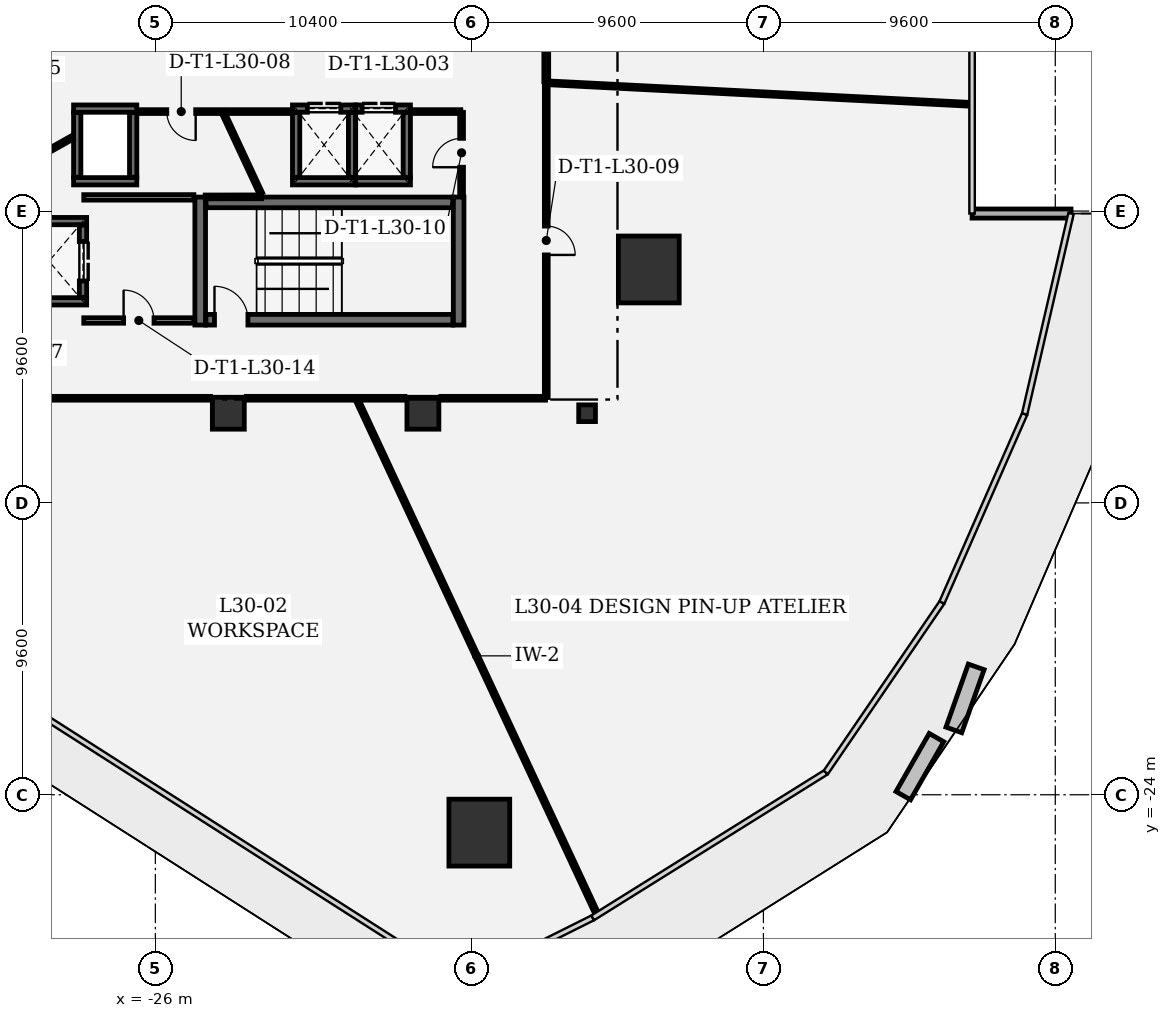
"""IFC4 building model, lengths in metres.
Left out: names, types, materials, properties, quantities, classifications, styles, units other than length and angle.
Written with IfcOpenShell. Run it as: python <this file> out.ifc"""

import sys

from ifc_helpers import new_model, si_unit, direction, frame, frame_2d, origin, origin_2d, place, context, subcontext, project, spatial, rectangle, extrude, element, fill, save


model = new_model("IFC4")
c1 = context("Model", 3, precision=1e-05, world=origin(), true_north=direction((0.0, 1.0)))
c2 = subcontext(c1, "Body", "Model", "MODEL_VIEW")
j1 = project(units=[si_unit("LENGTHUNIT", "METRE"), si_unit("PLANEANGLEUNIT", "RADIAN")], contexts=[c1])
p1 = place(None, origin())
s1 = spatial("IfcSite", under=j1, at=p1, CompositionType="ELEMENT")
p2 = place(p1, origin())
s2 = spatial("IfcBuilding", under=s1, at=p2, CompositionType="ELEMENT")
p3 = place(p2, frame((0.0, 0.0, 134.1)))
s3 = spatial("IfcBuildingStorey", under=s2, at=p3, CompositionType="ELEMENT", Elevation=134.1)
for number, where, z_axis, x_axis in (
    (1, (-15.344, -25.246, 0.0), (0.0, 0.0, 1.0), (1.0, 0.0, 0.0)),
    (2, (-9.77, -6.721, 0.0), (0.0, 0.0, 1.0), (1.0, 0.0, 0.0)),
):
    element("IfcColumn", number, at=place(p3, frame(where, z_axis=z_axis, x_axis=x_axis)), inside=s3, PredefinedType="COLUMN", context=c2, shape_type="SweptSolid", body=[
        extrude(rectangle(XDim=2.0, YDim=2.2, at=origin_2d()), origin(), (0.0, 0.0, 1.0), 4.05),
    ])
for number, where, z_axis, x_axis in (
    (3, (-17.2, -11.45, 0.0), (0.0, 0.0, 1.0), (1.0, 0.0, 0.0)),
    (4, (-23.6, -11.45, 0.0), (0.0, 0.0, 1.0), (1.0, 0.0, 0.0)),
):
    element("IfcColumn", number, at=place(p3, frame(where, z_axis=z_axis, x_axis=x_axis)), inside=s3, PredefinedType="COLUMN", context=c2, shape_type="SweptSolid", body=[
        extrude(rectangle(XDim=1.05, YDim=1.05, at=origin_2d()), origin(), (0.0, 0.0, 1.0), 4.05),
    ])
p4 = place(p3, frame((-11.8, -11.45, 0.0), z_axis=(0.0, 0.0, 1.0), x_axis=(1.0, 0.0, 0.0)))
e5 = element("IfcColumn", 5, at=p4, inside=s3, PredefinedType="COLUMN", context=c2, shape_type="SweptSolid", body=[
    extrude(rectangle(XDim=0.55, YDim=0.55, at=origin_2d()), origin(), (0.0, 0.0, 1.0), 4.05),
])
p5 = place(p3, frame((4.118, -4.882, 0.0), z_axis=(0.0, 0.0, 1.0), x_axis=(-1.0, 0.0, 0.0)))
e6 = element("IfcWall", 6, at=p5, inside=s3, PredefinedType="SOLIDWALL", context=c2, shape_type="SweptSolid", body=[
    extrude(rectangle(XDim=3.254, YDim=0.3, at=frame_2d((1.627, 0.0))), origin(), (0.0, 0.0, 1.0), 3.78),
])
for number, where, z_axis, x_axis in (
    (7, (-24.525, -4.34, 0.0), (0.0, 0.0, 1.0), (0.0, -1.0, 0.0)),
    (8, (-16.025, -8.55, 0.0), (0.0, 0.0, 1.0), (0.0, 1.0, 0.0)),
):
    element("IfcWall", number, at=place(p3, frame(where, z_axis=z_axis, x_axis=x_axis)), inside=s3, PredefinedType="SHEAR", context=c2, shape_type="SweptSolid", body=[
        extrude(rectangle(XDim=4.21, YDim=0.35, at=frame_2d((2.105, 0.0))), origin(), (0.0, 0.0, 1.0), 3.78),
    ])
p6 = place(p3, frame((-24.335, -8.375, 0.0), z_axis=(0.0, 0.0, 1.0), x_axis=(1.0, 0.0, 0.0)))
e9 = element("IfcWall", 9, at=p6, inside=s3, PredefinedType="SHEAR", context=c2, shape_type="SweptSolid", body=[
    extrude(rectangle(XDim=8.12, YDim=0.35, at=frame_2d((4.06, 0.0))), origin(), (0.0, 0.0, 1.0), 3.78),
])
p7 = place(p6, frame((0.28, 0.0, 0.0)))
e10 = element("IfcOpeningElement", 10, at=p7, cuts=e9, PredefinedType="OPENING", context=c2, shape_type="SweptSolid", body=[
    extrude(rectangle(XDim=1.1, YDim=2.2, at=frame_2d((0.55, 1.1))), frame((0.0, 0.185, 0.0), z_axis=(0.0, -1.0, 0.0), x_axis=(1.0, 0.0, 0.0)), (0.0, 0.0, 1.0), 0.37),
])
p8 = place(p3, frame((-16.215, -4.515, 0.0), z_axis=(0.0, 0.0, 1.0), x_axis=(-1.0, 0.0, 0.0)))
e11 = element("IfcWall", 11, at=p8, inside=s3, PredefinedType="SHEAR", context=c2, shape_type="SweptSolid", body=[
    extrude(rectangle(XDim=8.12, YDim=0.35, at=frame_2d((4.06, 0.0))), origin(), (0.0, 0.0, 1.0), 3.78),
])
for number, where, z_axis, x_axis in (
    (12, (-28.26, -7.77, 0.0), (0.0, 0.0, 1.0), (-1.0, 0.0, 0.0)),
    (13, (-30.74, -5.13, 0.0), (0.0, 0.0, 1.0), (1.0, 0.0, 0.0)),
):
    element("IfcWall", number, at=place(p3, frame(where, z_axis=z_axis, x_axis=x_axis)), inside=s3, PredefinedType="SHEAR", context=c2, shape_type="SweptSolid", body=[
        extrude(rectangle(XDim=2.48, YDim=0.24, at=frame_2d((1.24, 0.0))), origin(), (0.0, 0.0, 1.0), 3.78),
    ])
p9 = place(p3, frame((-28.38, -5.262, 0.0), z_axis=(0.0, 0.0, 1.0), x_axis=(0.0, -1.0, 0.0)))
e14 = element("IfcWall", 14, at=p9, inside=s3, PredefinedType="SHEAR", context=c2, shape_type="SweptSolid", body=[
    extrude(rectangle(XDim=2.376, YDim=0.24, at=frame_2d((1.188, 0.0))), origin(), (0.0, 0.0, 1.0), 3.78),
])
p10 = place(p9, frame((0.538, 0.0, 0.0)))
e15 = element("IfcOpeningElement", 15, at=p10, cuts=e14, PredefinedType="OPENING", context=c2, shape_type="SweptSolid", body=[
    extrude(rectangle(XDim=1.3, YDim=2.3, at=frame_2d((0.65, 1.15))), frame((0.0, 0.13, 0.0), z_axis=(0.0, -1.0, 0.0), x_axis=(1.0, 0.0, 0.0)), (0.0, 0.0, 1.0), 0.26),
])
for number, where, z_axis, x_axis in (
    (16, (-26.61, -3.82, 0.0), (0.0, 0.0, 1.0), (-1.0, 0.0, 0.0)),
    (17, (-28.69, -1.43, 0.0), (0.0, 0.0, 1.0), (1.0, 0.0, 0.0)),
):
    element("IfcWall", number, at=place(p3, frame(where, z_axis=z_axis, x_axis=x_axis)), inside=s3, PredefinedType="SHEAR", context=c2, shape_type="SweptSolid", body=[
        extrude(rectangle(XDim=2.08, YDim=0.24, at=frame_2d((1.04, 0.0))), origin(), (0.0, 0.0, 1.0), 3.78),
    ])
for number, where, z_axis, x_axis in (
    (18, (-28.57, -3.688, 0.0), (0.0, 0.0, 1.0), (0.0, 1.0, 0.0)),
    (19, (-26.73, -1.562, 0.0), (0.0, 0.0, 1.0), (0.0, -1.0, 0.0)),
):
    element("IfcWall", number, at=place(p3, frame(where, z_axis=z_axis, x_axis=x_axis)), inside=s3, PredefinedType="SHEAR", context=c2, shape_type="SweptSolid", body=[
        extrude(rectangle(XDim=2.126, YDim=0.24, at=frame_2d((1.063, 0.0))), origin(), (0.0, 0.0, 1.0), 3.78),
    ])
p11 = place(p3, frame((-19.41, -3.82, 0.0), z_axis=(0.0, 0.0, 1.0), x_axis=(-1.0, 0.0, 0.0)))
e20 = element("IfcWall", 20, at=p11, inside=s3, PredefinedType="SHEAR", context=c2, shape_type="SweptSolid", body=[
    extrude(rectangle(XDim=2.08, YDim=0.24, at=frame_2d((1.04, 0.0))), origin(), (0.0, 0.0, 1.0), 3.78),
])
p12 = place(p3, frame((-21.49, -1.43, 0.0), z_axis=(0.0, 0.0, 1.0), x_axis=(1.0, 0.0, 0.0)))
e21 = element("IfcWall", 21, at=p12, inside=s3, PredefinedType="SHEAR", context=c2, shape_type="SweptSolid", body=[
    extrude(rectangle(XDim=2.08, YDim=0.24, at=frame_2d((1.04, 0.0))), origin(), (0.0, 0.0, 1.0), 3.78),
])
p13 = place(p12, frame((0.49, 0.0, 0.0)))
e22 = element("IfcOpeningElement", 22, at=p13, cuts=e21, PredefinedType="OPENING", context=c2, shape_type="SweptSolid", body=[
    extrude(rectangle(XDim=1.1, YDim=2.2, at=frame_2d((0.55, 1.1))), frame((0.0, 0.13, 0.0), z_axis=(0.0, -1.0, 0.0), x_axis=(1.0, 0.0, 0.0)), (0.0, 0.0, 1.0), 0.26),
])
for number, where, z_axis, x_axis in (
    (23, (-21.37, -3.688, 0.0), (0.0, 0.0, 1.0), (0.0, 1.0, 0.0)),
    (24, (-19.53, -1.562, 0.0), (0.0, 0.0, 1.0), (0.0, -1.0, 0.0)),
):
    element("IfcWall", number, at=place(p3, frame(where, z_axis=z_axis, x_axis=x_axis)), inside=s3, PredefinedType="SHEAR", context=c2, shape_type="SweptSolid", body=[
        extrude(rectangle(XDim=2.126, YDim=0.24, at=frame_2d((1.063, 0.0))), origin(), (0.0, 0.0, 1.0), 3.78),
    ])
p14 = place(p3, frame((-17.61, -3.82, 0.0), z_axis=(0.0, 0.0, 1.0), x_axis=(-1.0, 0.0, 0.0)))
e25 = element("IfcWall", 25, at=p14, inside=s3, PredefinedType="SHEAR", context=c2, shape_type="SweptSolid", body=[
    extrude(rectangle(XDim=1.8, YDim=0.24, at=frame_2d((0.9, 0.0))), origin(), (0.0, 0.0, 1.0), 3.78),
])
p15 = place(p3, frame((-19.41, -1.43, 0.0), z_axis=(0.0, 0.0, 1.0), x_axis=(1.0, 0.0, 0.0)))
e26 = element("IfcWall", 26, at=p15, inside=s3, PredefinedType="SHEAR", context=c2, shape_type="SweptSolid", body=[
    extrude(rectangle(XDim=1.8, YDim=0.24, at=frame_2d((0.9, 0.0))), origin(), (0.0, 0.0, 1.0), 3.78),
])
p16 = place(p15, frame((0.21, 0.0, 0.0)))
e27 = element("IfcOpeningElement", 27, at=p16, cuts=e26, PredefinedType="OPENING", context=c2, shape_type="SweptSolid", body=[
    extrude(rectangle(XDim=1.1, YDim=2.2, at=frame_2d((0.55, 1.1))), frame((0.0, 0.13, 0.0), z_axis=(0.0, -1.0, 0.0), x_axis=(1.0, 0.0, 0.0)), (0.0, 0.0, 1.0), 0.26),
])
p17 = place(p3, frame((-17.73, -1.562, 0.0), z_axis=(0.0, 0.0, 1.0), x_axis=(0.0, -1.0, 0.0)))
e28 = element("IfcWall", 28, at=p17, inside=s3, PredefinedType="SHEAR", context=c2, shape_type="SweptSolid", body=[
    extrude(rectangle(XDim=2.126, YDim=0.24, at=frame_2d((1.063, 0.0))), origin(), (0.0, 0.0, 1.0), 3.78),
])
p18 = place(p3, frame((-28.355, -8.4, 0.0), z_axis=(0.0, 0.0, 1.0), x_axis=(1.0, 0.0, 0.0)))
e29 = element("IfcWall", 29, at=p18, inside=s3, PredefinedType="PARTITIONING", context=c2, shape_type="SweptSolid", body=[
    extrude(rectangle(XDim=3.622, YDim=0.18, at=frame_2d((1.811, 0.0))), origin(), (0.0, 0.0, 1.0), 3.78),
])
p19 = place(p18, frame((1.311, 0.0, 0.0)))
e30 = element("IfcOpeningElement", 30, at=p19, cuts=e29, PredefinedType="OPENING", context=c2, shape_type="SweptSolid", body=[
    extrude(rectangle(XDim=1.0, YDim=2.15, at=frame_2d((0.5, 1.075))), frame((0.0, 0.1, 0.0), z_axis=(0.0, -1.0, 0.0), x_axis=(1.0, 0.0, 0.0)), (0.0, 0.0, 1.0), 0.2),
])
p20 = place(p3, frame((-24.733, -4.35, 0.0), z_axis=(0.0, 0.0, 1.0), x_axis=(-1.0, 0.0, 0.0)))
e31 = element("IfcWall", 31, at=p20, inside=s3, PredefinedType="PARTITIONING", context=c2, shape_type="SweptSolid", body=[
    extrude(rectangle(XDim=3.622, YDim=0.18, at=frame_2d((1.811, 0.0))), origin(), (0.0, 0.0, 1.0), 3.78),
])
p21 = place(p3, frame((-24.19, -10.958, 0.0), z_axis=(0.0, 0.0, 1.0), x_axis=(-1.0, 0.0, 0.0)))
e32 = element("IfcWall", 32, at=p21, inside=s3, PredefinedType="PARTITIONING", context=c2, shape_type="SweptSolid", body=[
    extrude(rectangle(XDim=13.643, YDim=0.125, at=frame_2d((6.822, 0.0))), origin(), (0.0, 0.0, 1.0), 3.344),
])
p22 = place(p21, frame((6.346, 0.0, 0.0)))
e33 = element("IfcOpeningElement", 33, at=p22, cuts=e32, PredefinedType="OPENING", context=c2, shape_type="SweptSolid", body=[
    extrude(rectangle(XDim=0.95, YDim=2.15, at=frame_2d((0.475, 1.075))), frame((0.0, 0.073, 0.0), z_axis=(0.0, -1.0, 0.0), x_axis=(1.0, 0.0, 0.0)), (0.0, 0.0, 1.0), 0.145),
])
p23 = place(p3, frame((-11.496, -27.882, 0.0), z_axis=(0.0, 0.0, 1.0), x_axis=(-0.422692669293, 0.906273086507, 0.0)))
e34 = element("IfcWall", 34, at=p23, inside=s3, PredefinedType="PARTITIONING", context=c2, shape_type="SweptSolid", body=[
    extrude(rectangle(XDim=18.649, YDim=0.125, at=frame_2d((9.324, 0.0))), origin(), (0.0, 0.0, 1.0), 3.344),
])
p24 = place(p3, frame((-19.414, -10.958, 0.0), z_axis=(0.0, 0.0, 1.0), x_axis=(-1.0, 0.0, 0.0)))
e35 = element("IfcWall", 35, at=p24, inside=s3, PredefinedType="PARTITIONING", context=c2, shape_type="SweptSolid", body=[
    extrude(rectangle(XDim=3.596, YDim=0.125, at=frame_2d((1.798, 0.0))), origin(), (0.0, 0.0, 1.0), 3.78),
])
p25 = place(p3, frame((-23.812, -1.528, 0.0), z_axis=(0.0, 0.0, 1.0), x_axis=(-1.0, 0.0, 0.0)))
e36 = element("IfcWall", 36, at=p25, inside=s3, PredefinedType="PARTITIONING", context=c2, shape_type="SweptSolid", body=[
    extrude(rectangle(XDim=2.673, YDim=0.125, at=frame_2d((1.336, 0.0))), origin(), (0.0, 0.0, 1.0), 3.78),
])
p26 = place(p25, frame((0.861, 0.0, 0.0)))
e37 = element("IfcOpeningElement", 37, at=p26, cuts=e36, PredefinedType="OPENING", context=c2, shape_type="SweptSolid", body=[
    extrude(rectangle(XDim=0.95, YDim=2.15, at=frame_2d((0.475, 1.075))), frame((0.0, 0.073, 0.0), z_axis=(0.0, -1.0, 0.0), x_axis=(1.0, 0.0, 0.0)), (0.0, 0.0, 1.0), 0.145),
])
p27 = place(p3, frame((-28.732, -2.379, 0.0), z_axis=(0.0, 0.0, 1.0), x_axis=(-0.871711937641, -0.490018670842, 0.0)))
e38 = element("IfcWall", 38, at=p27, inside=s3, PredefinedType="PARTITIONING", context=c2, shape_type="SweptSolid", body=[
    extrude(rectangle(XDim=2.342, YDim=0.125, at=frame_2d((1.171, 0.0))), origin(), (0.0, 0.0, 1.0), 3.78),
])
p28 = place(p3, frame((-24.36, -4.335, 0.0), z_axis=(0.0, 0.0, 1.0), x_axis=(0.999998537438, 0.001710298775, 0.0)))
e39 = element("IfcWall", 39, at=p28, inside=s3, PredefinedType="PARTITIONING", context=c2, shape_type="SweptSolid", body=[
    extrude(rectangle(XDim=1.856, YDim=0.125, at=frame_2d((0.928, 0.0))), origin(), (0.0, 0.0, 1.0), 3.78),
])
p29 = place(p3, frame((-22.53, -4.224, 0.0), z_axis=(0.0, 0.0, 1.0), x_axis=(-0.422717831819, 0.906261350088, 0.0)))
e40 = element("IfcWall", 40, at=p29, inside=s3, PredefinedType="PARTITIONING", context=c2, shape_type="SweptSolid", body=[
    extrude(rectangle(XDim=2.95, YDim=0.125, at=frame_2d((1.475, 0.0))), origin(), (0.0, 0.0, 1.0), 3.78),
])
p30 = place(p3, frame((-17.79, -10.958, 0.0), z_axis=(0.0, 0.0, 1.0), x_axis=(-1.0, 0.0, 0.0)))
e41 = element("IfcWall", 41, at=p30, inside=s3, PredefinedType="PARTITIONING", context=c2, shape_type="SweptSolid", body=[
    extrude(rectangle(XDim=1.48, YDim=0.125, at=frame_2d((0.74, 0.0))), origin(), (0.0, 0.0, 1.0), 3.78),
])
p31 = place(p3, frame((0.783, -1.288, 0.0), z_axis=(0.0, 0.0, 1.0), x_axis=(-0.998704516963, 0.050885044939, 0.0)))
e42 = element("IfcWall", 42, at=p31, inside=s3, PredefinedType="PARTITIONING", context=c2, shape_type="SweptSolid", body=[
    extrude(rectangle(XDim=13.919, YDim=0.125, at=frame_2d((6.959, 0.0))), origin(), (0.0, 0.0, 1.0), 3.78),
])
p32 = place(p3, frame((-13.142, -0.604, 0.0), z_axis=(0.0, 0.0, 1.0), x_axis=(0.0, -1.0, 0.0)))
e43 = element("IfcWall", 43, at=p32, inside=s3, PredefinedType="PARTITIONING", context=c2, shape_type="SweptSolid", body=[
    extrude(rectangle(XDim=10.33, YDim=0.125, at=frame_2d((5.165, 0.0))), origin(), (0.0, 0.0, 1.0), 3.78),
])
p33 = place(p32, frame((4.69, 0.0, 0.0)))
e44 = element("IfcOpeningElement", 44, at=p33, cuts=e43, PredefinedType="OPENING", context=c2, shape_type="SweptSolid", body=[
    extrude(rectangle(XDim=0.95, YDim=2.15, at=frame_2d((0.475, 1.075))), frame((0.0, 0.073, 0.0), z_axis=(0.0, -1.0, 0.0), x_axis=(1.0, 0.0, 0.0)), (0.0, 0.0, 1.0), 0.145),
])
p34 = place(p3, frame((-13.167, -10.958, 0.0), z_axis=(0.0, 0.0, 1.0), x_axis=(-1.0, 0.0, 0.0)))
e45 = element("IfcWall", 45, at=p34, inside=s3, PredefinedType="PARTITIONING", context=c2, shape_type="SweptSolid", body=[
    extrude(rectangle(XDim=3.443, YDim=0.125, at=frame_2d((1.722, 0.0))), origin(), (0.0, 0.0, 1.0), 2.895),
])
p35 = place(p3, frame((-15.928, -4.214, 0.0), z_axis=(0.0, 0.0, 1.0), x_axis=(0.0, 1.0, 0.0)))
e46 = element("IfcWall", 46, at=p35, inside=s3, PredefinedType="PARTITIONING", context=c2, shape_type="SweptSolid", body=[
    extrude(rectangle(XDim=2.661, YDim=0.125, at=frame_2d((1.331, 0.0))), origin(), (0.0, 0.0, 1.0), 3.78),
])
p36 = place(p35, frame((0.855, 0.0, 0.0)))
e47 = element("IfcOpeningElement", 47, at=p36, cuts=e46, PredefinedType="OPENING", context=c2, shape_type="SweptSolid", body=[
    extrude(rectangle(XDim=0.95, YDim=2.15, at=frame_2d((0.475, 1.075))), frame((0.0, 0.073, 0.0), z_axis=(0.0, -1.0, 0.0), x_axis=(1.0, 0.0, 0.0)), (0.0, 0.0, 1.0), 0.145),
])
p37 = place(p3, frame((-15.953, -1.528, 0.0), z_axis=(0.0, 0.0, 1.0), x_axis=(-1.0, 0.0, 0.0)))
e48 = element("IfcWall", 48, at=p37, inside=s3, PredefinedType="PARTITIONING", context=c2, shape_type="SweptSolid", body=[
    extrude(rectangle(XDim=1.532, YDim=0.125, at=frame_2d((0.766, 0.0))), origin(), (0.0, 0.0, 1.0), 3.78),
])
p38 = place(p3, frame((-21.615, -1.528, 0.0), z_axis=(0.0, 0.0, 1.0), x_axis=(-1.0, 0.0, 0.0)))
e49 = element("IfcWall", 49, at=p38, inside=s3, PredefinedType="PARTITIONING", context=c2, shape_type="SweptSolid", body=[
    extrude(rectangle(XDim=2.054, YDim=0.125, at=frame_2d((1.027, 0.0))), origin(), (0.0, 0.0, 1.0), 3.78),
])
p39 = place(p3, frame((-13.142, 8.287, 0.0), z_axis=(0.0, 0.0, 1.0), x_axis=(0.0, -1.0, 0.0)))
e50 = element("IfcWall", 50, at=p39, inside=s3, PredefinedType="PARTITIONING", context=c2, shape_type="SweptSolid", body=[
    extrude(rectangle(XDim=8.833, YDim=0.16, at=frame_2d((4.417, 0.0))), origin(), (0.0, 0.0, 1.0), 3.78),
])
p40 = place(p7, origin())
e51 = element("IfcDoor", 51, at=p40, inside=s3, OperationType="SINGLE_SWING_LEFT", PredefinedType="DOOR", context=c2, shape_type="SweptSolid", body=[
    extrude(rectangle(XDim=1.1, YDim=2.2, at=frame_2d((0.55, 1.1))), frame((0.0, 0.025, 0.0), z_axis=(0.0, -1.0, 0.0), x_axis=(1.0, 0.0, 0.0)), (0.0, 0.0, 1.0), 0.05),
])
fill(e10, e51)
p41 = place(p10, origin())
e52 = element("IfcDoor", 52, at=p41, inside=s3, OperationType="DOUBLE_DOOR_SLIDING", PredefinedType="DOOR", context=c2, shape_type="SweptSolid", body=[
    extrude(rectangle(XDim=1.3, YDim=2.3, at=frame_2d((0.65, 1.15))), frame((0.0, 0.025, 0.0), z_axis=(0.0, -1.0, 0.0), x_axis=(1.0, 0.0, 0.0)), (0.0, 0.0, 1.0), 0.05),
])
fill(e15, e52)
p42 = place(p13, origin())
e53 = element("IfcDoor", 53, at=p42, inside=s3, OperationType="DOUBLE_DOOR_SLIDING", PredefinedType="DOOR", context=c2, shape_type="SweptSolid", body=[
    extrude(rectangle(XDim=1.1, YDim=2.2, at=frame_2d((0.55, 1.1))), frame((0.0, 0.025, 0.0), z_axis=(0.0, -1.0, 0.0), x_axis=(1.0, 0.0, 0.0)), (0.0, 0.0, 1.0), 0.05),
])
fill(e22, e53)
p43 = place(p16, origin())
e54 = element("IfcDoor", 54, at=p43, inside=s3, OperationType="DOUBLE_DOOR_SLIDING", PredefinedType="DOOR", context=c2, shape_type="SweptSolid", body=[
    extrude(rectangle(XDim=1.1, YDim=2.2, at=frame_2d((0.55, 1.1))), frame((0.0, 0.025, 0.0), z_axis=(0.0, -1.0, 0.0), x_axis=(1.0, 0.0, 0.0)), (0.0, 0.0, 1.0), 0.05),
])
fill(e27, e54)
p44 = place(p26, origin())
e55 = element("IfcDoor", 55, at=p44, inside=s3, OperationType="SINGLE_SWING_LEFT", PredefinedType="DOOR", context=c2, shape_type="SweptSolid", body=[
    extrude(rectangle(XDim=0.95, YDim=2.15, at=frame_2d((0.475, 1.075))), frame((0.0, 0.025, 0.0), z_axis=(0.0, -1.0, 0.0), x_axis=(1.0, 0.0, 0.0)), (0.0, 0.0, 1.0), 0.05),
])
fill(e37, e55)
p45 = place(p33, origin())
e56 = element("IfcDoor", 56, at=p45, inside=s3, OperationType="SINGLE_SWING_RIGHT", PredefinedType="DOOR", context=c2, shape_type="SweptSolid", body=[
    extrude(rectangle(XDim=0.95, YDim=2.15, at=frame_2d((0.475, 1.075))), frame((0.0, 0.025, 0.0), z_axis=(0.0, -1.0, 0.0), x_axis=(1.0, 0.0, 0.0)), (0.0, 0.0, 1.0), 0.05),
])
fill(e44, e56)
p46 = place(p36, origin())
e57 = element("IfcDoor", 57, at=p46, inside=s3, OperationType="SINGLE_SWING_LEFT", PredefinedType="DOOR", context=c2, shape_type="SweptSolid", body=[
    extrude(rectangle(XDim=0.95, YDim=2.15, at=frame_2d((0.475, 1.075))), frame((0.0, 0.025, 0.0), z_axis=(0.0, -1.0, 0.0), x_axis=(1.0, 0.0, 0.0)), (0.0, 0.0, 1.0), 0.05),
])
fill(e47, e57)
p47 = place(p19, origin())
e58 = element("IfcDoor", 58, at=p47, inside=s3, OperationType="SINGLE_SWING_LEFT", PredefinedType="DOOR", context=c2, shape_type="SweptSolid", body=[
    extrude(rectangle(XDim=1.0, YDim=2.15, at=frame_2d((0.5, 1.075))), frame((0.0, 0.025, 0.0), z_axis=(0.0, -1.0, 0.0), x_axis=(1.0, 0.0, 0.0)), (0.0, 0.0, 1.0), 0.05),
])
fill(e30, e58)
save(model, sys.argv[1])
